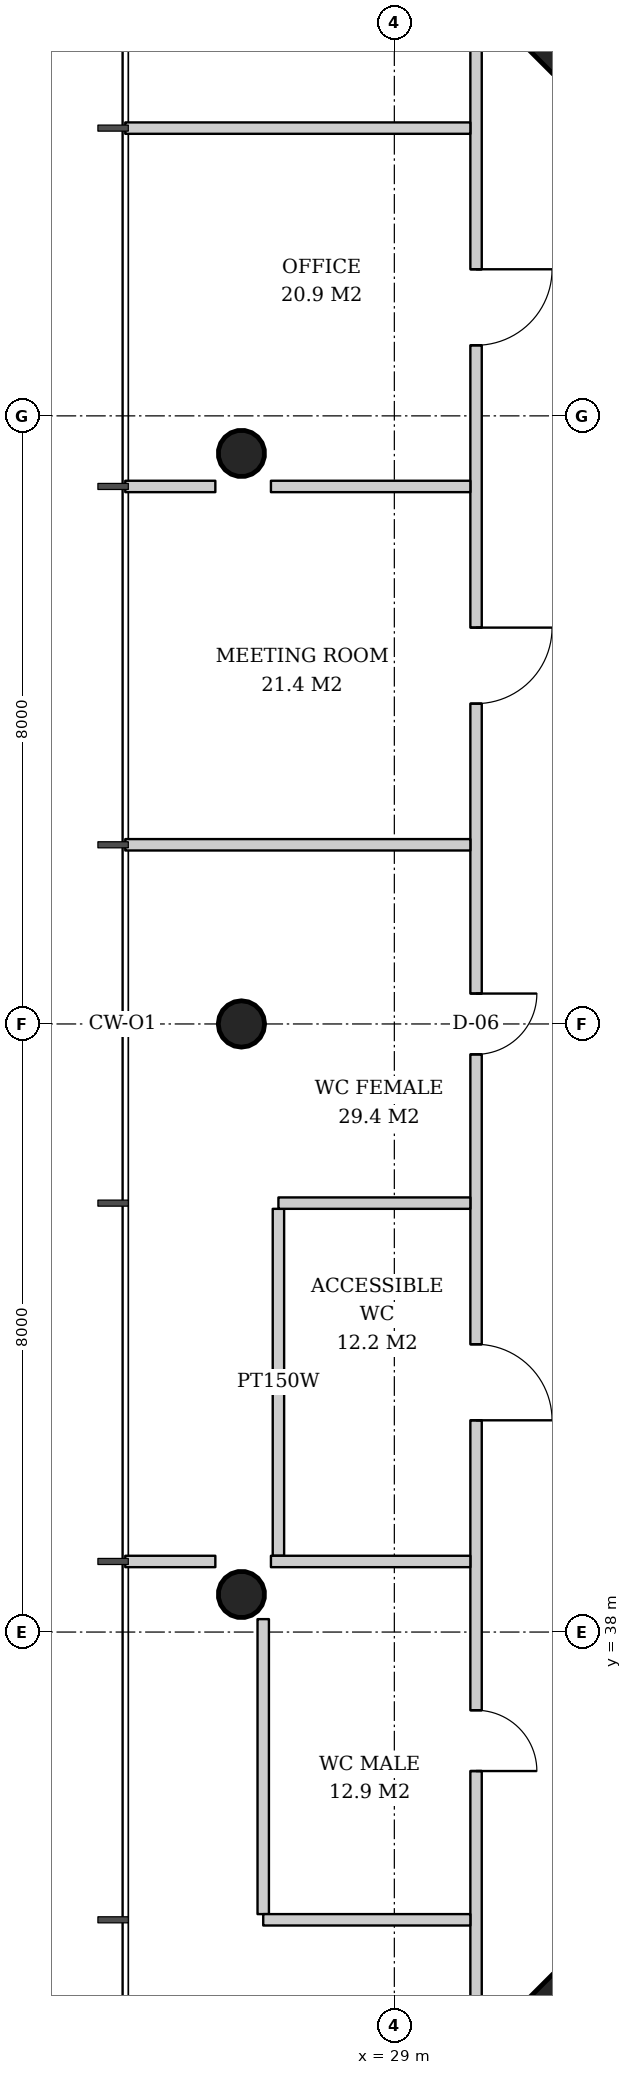
"""IFC4 building model, lengths in metres.
Left out: names, types, materials, properties, quantities, classifications, styles, units other than length and angle.
Written with IfcOpenShell. Run it as: python <this file> out.ifc"""

import sys

from ifc_helpers import new_model, si_unit, direction, frame, frame_2d, origin, origin_2d, place, context, subcontext, project, spatial, rectangle, hollow_circle, extrude, element, fill, save


model = new_model("IFC4")
c1 = context("Model", 3, precision=1e-05, world=origin(), true_north=direction((0.0, 1.0)))
c2 = subcontext(c1, "Body", "Model", "MODEL_VIEW")
j1 = project(units=[si_unit("LENGTHUNIT", "METRE"), si_unit("PLANEANGLEUNIT", "RADIAN")], contexts=[c1])
p1 = place(None, origin())
s1 = spatial("IfcSite", under=j1, at=p1, CompositionType="ELEMENT")
p2 = place(p1, origin())
s2 = spatial("IfcBuilding", under=s1, at=p2, CompositionType="ELEMENT")
p3 = place(p2, frame((0.0, 0.0, 207.2)))
s3 = spatial("IfcBuildingStorey", under=s2, at=p3, CompositionType="ELEMENT", Elevation=207.2)
for number, where, z_axis, x_axis in (
    (1, (31.05, 59.95, 0.0), (0.032, -0.032, 0.999), (0.707, 0.707, 0.0)),
    (2, (31.05, 32.05, 0.0), (0.032, 0.032, 0.999), (-0.707, 0.707, 0.0)),
):
    element("IfcColumn", number, at=place(p3, frame(where, z_axis=z_axis, x_axis=x_axis)), inside=s3, PredefinedType="COLUMN", context=c2, shape_type="SweptSolid", body=[
        extrude(rectangle(XDim=2.0, YDim=2.0, at=origin_2d()), origin(), (0.0, 0.0, 1.0), 3.804),
    ])
p4 = place(p3, frame((26.95, 53.525, 0.0), z_axis=(0.031974442509, -0.015923015547, 0.999361842679), x_axis=(0.445775033553, 0.895145027055, 0.0)))
e3 = element("IfcColumn", 3, at=p4, inside=s3, PredefinedType="COLUMN", context=c2, shape_type="SweptSolid", body=[
    extrude(hollow_circle(Radius=0.305, WallThickness=0.025, at=origin_2d()), origin(), (0.0, 0.0, 1.0), 3.802),
])
p5 = place(p3, frame((26.95, 46.0, 0.0), z_axis=(0.031978496719, 0.0, 0.999488557087), x_axis=(0.0, 1.0, 0.0)))
e4 = element("IfcColumn", 4, at=p5, inside=s3, PredefinedType="COLUMN", context=c2, shape_type="SweptSolid", body=[
    extrude(hollow_circle(Radius=0.305, WallThickness=0.025, at=origin_2d()), origin(), (0.0, 0.0, 1.0), 3.802),
])
p6 = place(p3, frame((26.95, 38.475, 0.0), z_axis=(0.031974442509, 0.015923015547, 0.999361842679), x_axis=(-0.445775033553, 0.895145027055, 0.0)))
e5 = element("IfcColumn", 5, at=p6, inside=s3, PredefinedType="COLUMN", context=c2, shape_type="SweptSolid", body=[
    extrude(hollow_circle(Radius=0.305, WallThickness=0.025, at=origin_2d()), origin(), (0.0, 0.0, 1.0), 3.802),
])
p7 = place(p3, frame((27.475, 43.568, 0.0), z_axis=(0.0, 0.0, 1.0), x_axis=(0.0, -1.0, 0.0)))
e6 = element("IfcWall", 6, at=p7, inside=s3, PredefinedType="PARTITIONING", context=c2, shape_type="SweptSolid", body=[
    extrude(rectangle(XDim=4.564, YDim=0.15, at=frame_2d((2.282, 0.0))), origin(), (0.0, 0.0, 1.0), 2.867),
])
p8 = place(p3, frame((27.275, 38.17, 0.0), z_axis=(0.0, 0.0, 1.0), x_axis=(0.0, -1.0, 0.0)))
e7 = element("IfcWall", 7, at=p8, inside=s3, PredefinedType="PARTITIONING", context=c2, shape_type="SweptSolid", body=[
    extrude(rectangle(XDim=3.881, YDim=0.15, at=frame_2d((1.94, 0.0))), origin(), (0.0, 0.0, 1.0), 2.867),
])
p9 = place(p3, frame((30.075, 59.436, 0.0), z_axis=(0.0, 0.0, 1.0), x_axis=(0.0, -1.0, 0.0)))
e8 = element("IfcWall", 8, at=p9, inside=s3, PredefinedType="PARTITIONING", context=c2, shape_type="SweptSolid", body=[
    extrude(rectangle(XDim=26.872, YDim=0.15, at=frame_2d((13.436, 0.0))), origin(), (0.0, 0.0, 1.0), 2.867),
])
p10 = place(p9, frame((3.507, 0.0, 0.0)))
e9 = element("IfcOpeningElement", 9, at=p10, cuts=e8, PredefinedType="OPENING", context=c2, shape_type="SweptSolid", body=[
    extrude(rectangle(XDim=1.0, YDim=2.1, at=frame_2d((0.5, 1.05))), frame((0.0, 0.085, 0.0), z_axis=(0.0, -1.0, 0.0), x_axis=(1.0, 0.0, 0.0)), (0.0, 0.0, 1.0), 0.17),
])
p11 = place(p9, frame((8.221, 0.0, 0.0)))
e10 = element("IfcOpeningElement", 10, at=p11, cuts=e8, PredefinedType="OPENING", context=c2, shape_type="SweptSolid", body=[
    extrude(rectangle(XDim=1.0, YDim=2.1, at=frame_2d((0.5, 1.05))), frame((0.0, 0.085, 0.0), z_axis=(0.0, -1.0, 0.0), x_axis=(1.0, 0.0, 0.0)), (0.0, 0.0, 1.0), 0.17),
])
p12 = place(p9, frame((13.036, 0.0, 0.0)))
e11 = element("IfcOpeningElement", 11, at=p12, cuts=e8, PredefinedType="OPENING", context=c2, shape_type="SweptSolid", body=[
    extrude(rectangle(XDim=0.8, YDim=2.1, at=frame_2d((0.4, 1.05))), frame((0.0, 0.085, 0.0), z_axis=(0.0, -1.0, 0.0), x_axis=(1.0, 0.0, 0.0)), (0.0, 0.0, 1.0), 0.17),
])
p13 = place(p9, frame((17.65, 0.0, 0.0)))
e12 = element("IfcOpeningElement", 12, at=p13, cuts=e8, PredefinedType="OPENING", context=c2, shape_type="SweptSolid", body=[
    extrude(rectangle(XDim=1.0, YDim=2.1, at=frame_2d((0.5, 1.05))), frame((0.0, 0.085, 0.0), z_axis=(0.0, -1.0, 0.0), x_axis=(1.0, 0.0, 0.0)), (0.0, 0.0, 1.0), 0.17),
])
p14 = place(p9, frame((22.464, 0.0, 0.0)))
e13 = element("IfcOpeningElement", 13, at=p14, cuts=e8, PredefinedType="OPENING", context=c2, shape_type="SweptSolid", body=[
    extrude(rectangle(XDim=0.8, YDim=2.1, at=frame_2d((0.4, 1.05))), frame((0.0, 0.085, 0.0), z_axis=(0.0, -1.0, 0.0), x_axis=(1.0, 0.0, 0.0)), (0.0, 0.0, 1.0), 0.17),
])
p15 = place(p3, frame((30.0, 57.786, 0.0), z_axis=(0.0, 0.0, 1.0), x_axis=(-1.0, 0.0, 0.0)))
e14 = element("IfcWall", 14, at=p15, inside=s3, PredefinedType="PARTITIONING", context=c2, shape_type="SweptSolid", body=[
    extrude(rectangle(XDim=4.54, YDim=0.15, at=frame_2d((2.27, 0.0))), origin(), (0.0, 0.0, 1.0), 3.12),
])
p16 = place(p3, frame((30.0, 53.072, 0.0), z_axis=(0.0, 0.0, 1.0), x_axis=(-1.0, 0.0, 0.0)))
e15 = element("IfcWall", 15, at=p16, inside=s3, PredefinedType="PARTITIONING", context=c2, shape_type="SweptSolid", body=[
    extrude(rectangle(XDim=2.624, YDim=0.15, at=frame_2d((1.312, 0.0))), origin(), (0.0, 0.0, 1.0), 3.62),
])
p17 = place(p3, frame((26.645, 53.072, 0.0), z_axis=(0.0, 0.0, 1.0), x_axis=(-1.0, 0.0, 0.0)))
e16 = element("IfcWall", 16, at=p17, inside=s3, PredefinedType="PARTITIONING", context=c2, shape_type="SweptSolid", body=[
    extrude(rectangle(XDim=1.185, YDim=0.15, at=frame_2d((0.593, 0.0))), origin(), (0.0, 0.0, 1.0), 3.62),
])
p18 = place(p3, frame((30.0, 48.357, 0.0), z_axis=(0.0, 0.0, 1.0), x_axis=(-1.0, 0.0, 0.0)))
e17 = element("IfcWall", 17, at=p18, inside=s3, PredefinedType="PARTITIONING", context=c2, shape_type="SweptSolid", body=[
    extrude(rectangle(XDim=4.54, YDim=0.15, at=frame_2d((2.27, 0.0))), origin(), (0.0, 0.0, 1.0), 3.12),
])
p19 = place(p3, frame((30.0, 43.643, 0.0), z_axis=(0.0, 0.0, 1.0), x_axis=(-1.0, 0.0, 0.0)))
e18 = element("IfcWall", 18, at=p19, inside=s3, PredefinedType="PARTITIONING", context=c2, shape_type="SweptSolid", body=[
    extrude(rectangle(XDim=2.525, YDim=0.15, at=frame_2d((1.262, 0.0))), origin(), (0.0, 0.0, 1.0), 2.867),
])
p20 = place(p3, frame((30.0, 38.928, 0.0), z_axis=(0.0, 0.0, 1.0), x_axis=(-1.0, 0.0, 0.0)))
e19 = element("IfcWall", 19, at=p20, inside=s3, PredefinedType="PARTITIONING", context=c2, shape_type="SweptSolid", body=[
    extrude(rectangle(XDim=2.624, YDim=0.15, at=frame_2d((1.312, 0.0))), origin(), (0.0, 0.0, 1.0), 3.62),
])
p21 = place(p3, frame((26.645, 38.928, 0.0), z_axis=(0.0, 0.0, 1.0), x_axis=(-1.0, 0.0, 0.0)))
e20 = element("IfcWall", 20, at=p21, inside=s3, PredefinedType="PARTITIONING", context=c2, shape_type="SweptSolid", body=[
    extrude(rectangle(XDim=1.185, YDim=0.15, at=frame_2d((0.593, 0.0))), origin(), (0.0, 0.0, 1.0), 3.62),
])
p22 = place(p3, frame((30.0, 34.214, 0.0), z_axis=(0.0, 0.0, 1.0), x_axis=(-1.0, 0.0, 0.0)))
e21 = element("IfcWall", 21, at=p22, inside=s3, PredefinedType="PARTITIONING", context=c2, shape_type="SweptSolid", body=[
    extrude(rectangle(XDim=2.725, YDim=0.15, at=frame_2d((1.363, 0.0))), origin(), (0.0, 0.0, 1.0), 3.62),
])
p23 = place(p10, origin())
e22 = element("IfcDoor", 22, at=p23, inside=s3, OperationType="SINGLE_SWING_LEFT", PredefinedType="DOOR", context=c2, shape_type="SweptSolid", body=[
    extrude(rectangle(XDim=1.0, YDim=2.1, at=frame_2d((0.5, 1.05))), frame((0.0, 0.025, 0.0), z_axis=(0.0, -1.0, 0.0), x_axis=(1.0, 0.0, 0.0)), (0.0, 0.0, 1.0), 0.05),
])
fill(e9, e22)
p24 = place(p11, origin())
e23 = element("IfcDoor", 23, at=p24, inside=s3, OperationType="SINGLE_SWING_LEFT", PredefinedType="DOOR", context=c2, shape_type="SweptSolid", body=[
    extrude(rectangle(XDim=1.0, YDim=2.1, at=frame_2d((0.5, 1.05))), frame((0.0, 0.025, 0.0), z_axis=(0.0, -1.0, 0.0), x_axis=(1.0, 0.0, 0.0)), (0.0, 0.0, 1.0), 0.05),
])
fill(e10, e23)
p25 = place(p12, origin())
e24 = element("IfcDoor", 24, at=p25, inside=s3, OperationType="SINGLE_SWING_LEFT", PredefinedType="DOOR", context=c2, shape_type="SweptSolid", body=[
    extrude(rectangle(XDim=0.8, YDim=2.1, at=frame_2d((0.4, 1.05))), frame((0.0, 0.025, 0.0), z_axis=(0.0, -1.0, 0.0), x_axis=(1.0, 0.0, 0.0)), (0.0, 0.0, 1.0), 0.05),
])
fill(e11, e24)
p26 = place(p13, origin())
e25 = element("IfcDoor", 25, at=p26, inside=s3, OperationType="SINGLE_SWING_RIGHT", PredefinedType="DOOR", context=c2, shape_type="SweptSolid", body=[
    extrude(rectangle(XDim=1.0, YDim=2.1, at=frame_2d((0.5, 1.05))), frame((0.0, 0.025, 0.0), z_axis=(0.0, -1.0, 0.0), x_axis=(1.0, 0.0, 0.0)), (0.0, 0.0, 1.0), 0.05),
])
fill(e12, e25)
p27 = place(p14, origin())
e26 = element("IfcDoor", 26, at=p27, inside=s3, OperationType="SINGLE_SWING_RIGHT", PredefinedType="DOOR", context=c2, shape_type="SweptSolid", body=[
    extrude(rectangle(XDim=0.8, YDim=2.1, at=frame_2d((0.4, 1.05))), frame((0.0, 0.025, 0.0), z_axis=(0.0, -1.0, 0.0), x_axis=(1.0, 0.0, 0.0)), (0.0, 0.0, 1.0), 0.05),
])
fill(e13, e26)
save(model, sys.argv[1])
